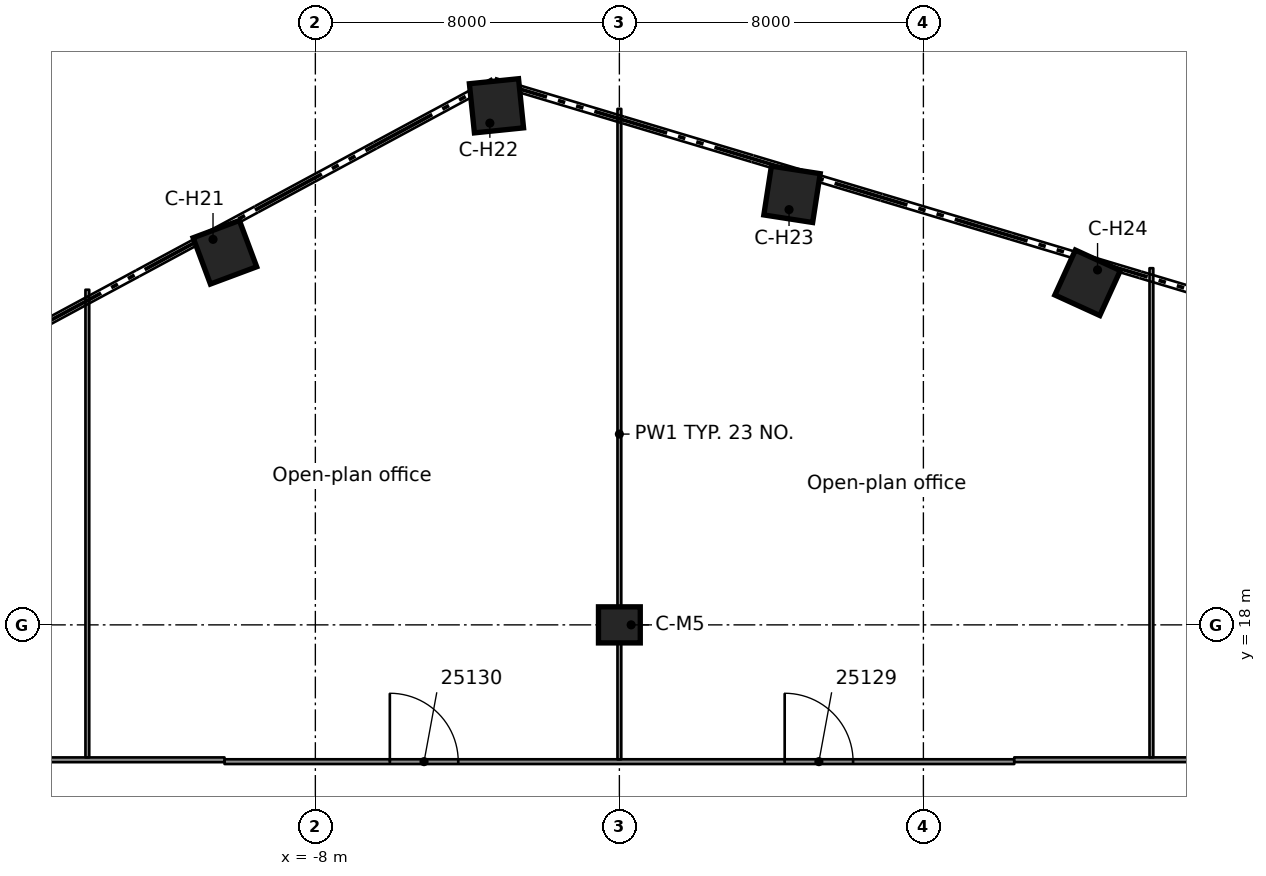
"""IFC4 building model, lengths in metres.
Left out: names, types, materials, properties, quantities, classifications, styles, units other than length and angle.
Written with IfcOpenShell. Run it as: python <this file> out.ifc"""

import sys

from ifc_helpers import new_model, si_unit, direction, frame, frame_2d, origin, origin_2d, place, context, subcontext, project, spatial, rectangle, extrude, element, fill, save


model = new_model("IFC4")
c1 = context("Model", 3, precision=1e-05, world=origin(), true_north=direction((0.0, 1.0)))
c2 = subcontext(c1, "Body", "Model", "MODEL_VIEW")
j1 = project(units=[si_unit("LENGTHUNIT", "METRE"), si_unit("PLANEANGLEUNIT", "RADIAN")], contexts=[c1])
p1 = place(None, origin())
s1 = spatial("IfcSite", under=j1, at=p1, CompositionType="ELEMENT")
p2 = place(p1, origin())
s2 = spatial("IfcBuilding", under=s1, at=p2, CompositionType="ELEMENT")
p3 = place(p2, frame((0.0, 0.0, 127.2)))
s3 = spatial("IfcBuildingStorey", under=s2, at=p3, CompositionType="ELEMENT", Elevation=127.2)
for number, where, z_axis, x_axis in (
    (1, (-10.38, 27.804, 0.0), (0.0, 0.0, 1.0), (-0.35, 0.937, 0.0)),
    (2, (-3.234, 31.658, 0.0), (0.0, 0.0, 1.0), (-0.102, 0.995, 0.0)),
    (3, (4.543, 29.329, 0.0), (0.0, 0.0, 1.0), (0.153, 0.988, 0.0)),
    (4, (12.321, 27.001, 0.0), (0.0, 0.0, 1.0), (0.415, 0.91, 0.0)),
):
    element("IfcColumn", number, at=place(p3, frame(where, z_axis=z_axis, x_axis=x_axis)), inside=s3, PredefinedType="COLUMN", context=c2, shape_type="SweptSolid", body=[
        extrude(rectangle(XDim=1.3, YDim=1.3, at=origin_2d()), origin(), (0.0, 0.0, 1.0), 3.5),
    ])
p4 = place(p3, frame((0.0, 18.0, 0.0), z_axis=(0.0, 0.0, 1.0), x_axis=(1.0, 0.0, 0.0)))
e5 = element("IfcColumn", 5, at=p4, inside=s3, PredefinedType="COLUMN", context=c2, shape_type="SweptSolid", body=[
    extrude(rectangle(XDim=1.1, YDim=0.95, at=origin_2d()), origin(), (0.0, 0.0, 1.0), 3.5),
])
p5 = place(p3, frame((-10.39, 14.401, 0.0), z_axis=(0.0, 0.0, 1.0), x_axis=(1.0, 0.0, 0.0)))
e6 = element("IfcWall", 6, at=p5, inside=s3, PredefinedType="PARTITIONING", context=c2, shape_type="SweptSolid", body=[
    extrude(rectangle(XDim=20.781, YDim=0.125, at=frame_2d((10.391, 0.0))), origin(), (0.0, 0.0, 1.0), 3.08),
])
p6 = place(p5, frame((14.74, 0.0, 0.0)))
e7 = element("IfcOpeningElement", 7, at=p6, cuts=e6, PredefinedType="OPENING", context=c2, shape_type="SweptSolid", body=[
    extrude(rectangle(XDim=1.8, YDim=2.1, at=frame_2d((0.9, 1.05))), frame((0.0, 0.073, 0.0), z_axis=(0.0, -1.0, 0.0), x_axis=(1.0, 0.0, 0.0)), (0.0, 0.0, 1.0), 0.145),
])
p7 = place(p5, frame((4.35, 0.0, 0.0)))
e8 = element("IfcOpeningElement", 8, at=p7, cuts=e6, PredefinedType="OPENING", context=c2, shape_type="SweptSolid", body=[
    extrude(rectangle(XDim=1.8, YDim=2.1, at=frame_2d((0.9, 1.05))), frame((0.0, 0.073, 0.0), z_axis=(0.0, -1.0, 0.0), x_axis=(1.0, 0.0, 0.0)), (0.0, 0.0, 1.0), 0.145),
])
p8 = place(p3, frame((-25.398, 14.45, 0.0), z_axis=(0.0, 0.0, 1.0), x_axis=(1.0, 0.0, 0.0)))
e9 = element("IfcWall", 9, at=p8, inside=s3, PredefinedType="PARTITIONING", context=c2, shape_type="SweptSolid", body=[
    extrude(rectangle(XDim=15.007, YDim=0.125, at=frame_2d((7.503, 0.0))), origin(), (0.0, 0.0, 1.0), 3.08),
])
p9 = place(p3, frame((10.391, 14.451, 0.0), z_axis=(0.0, 0.0, 1.0), x_axis=(1.0, 0.0, 0.0)))
e10 = element("IfcWall", 10, at=p9, inside=s3, PredefinedType="PARTITIONING", context=c2, shape_type="SweptSolid", body=[
    extrude(rectangle(XDim=10.996, YDim=0.125, at=frame_2d((5.498, 0.0))), origin(), (0.0, 0.0, 1.0), 3.08),
])
p10 = place(p9, frame((6.459, 0.0, 0.0)))
e11 = element("IfcOpeningElement", 11, at=p10, cuts=e10, PredefinedType="OPENING", context=c2, shape_type="SweptSolid", body=[
    extrude(rectangle(XDim=1.8, YDim=2.1, at=frame_2d((0.9, 1.05))), frame((0.0, 0.073, 0.0), z_axis=(0.0, -1.0, 0.0), x_axis=(1.0, 0.0, 0.0)), (0.0, 0.0, 1.0), 0.145),
])
p11 = place(p3, frame((14.0, 14.514, 0.0), z_axis=(0.0, 0.0, 1.0), x_axis=(0.0, 1.0, 0.0)))
e12 = element("IfcWall", 12, at=p11, inside=s3, PredefinedType="PARTITIONING", context=c2, shape_type="SweptSolid", body=[
    extrude(rectangle(XDim=12.871, YDim=0.1, at=frame_2d((6.436, 0.0))), origin(), (0.0, 0.0, 1.0), 3.08),
])
p12 = place(p3, frame((0.0, 14.463, 0.0), z_axis=(0.0, 0.0, 1.0), x_axis=(0.0, 1.0, 0.0)))
e13 = element("IfcWall", 13, at=p12, inside=s3, PredefinedType="PARTITIONING", context=c2, shape_type="SweptSolid", body=[
    extrude(rectangle(XDim=17.114, YDim=0.1, at=frame_2d((8.557, 0.0))), origin(), (0.0, 0.0, 1.0), 3.08),
])
p13 = place(p3, frame((-14.0, 14.514, 0.0), z_axis=(0.0, 0.0, 1.0), x_axis=(0.0, 1.0, 0.0)))
e14 = element("IfcWall", 14, at=p13, inside=s3, PredefinedType="PARTITIONING", context=c2, shape_type="SweptSolid", body=[
    extrude(rectangle(XDim=12.304, YDim=0.1, at=frame_2d((6.152, 0.0))), origin(), (0.0, 0.0, 1.0), 3.08),
])
p14 = place(p6, origin())
e15 = element("IfcDoor", 15, at=p14, inside=s3, OperationType="DOUBLE_DOOR_SINGLE_SWING", PredefinedType="DOOR", context=c2, shape_type="SweptSolid", body=[
    extrude(rectangle(XDim=1.8, YDim=2.1, at=frame_2d((0.9, 1.05))), frame((0.0, 0.025, 0.0), z_axis=(0.0, -1.0, 0.0), x_axis=(1.0, 0.0, 0.0)), (0.0, 0.0, 1.0), 0.05),
])
fill(e7, e15)
p15 = place(p7, origin())
e16 = element("IfcDoor", 16, at=p15, inside=s3, OperationType="DOUBLE_DOOR_SINGLE_SWING", PredefinedType="DOOR", context=c2, shape_type="SweptSolid", body=[
    extrude(rectangle(XDim=1.8, YDim=2.1, at=frame_2d((0.9, 1.05))), frame((0.0, 0.025, 0.0), z_axis=(0.0, -1.0, 0.0), x_axis=(1.0, 0.0, 0.0)), (0.0, 0.0, 1.0), 0.05),
])
fill(e8, e16)
save(model, sys.argv[1])
